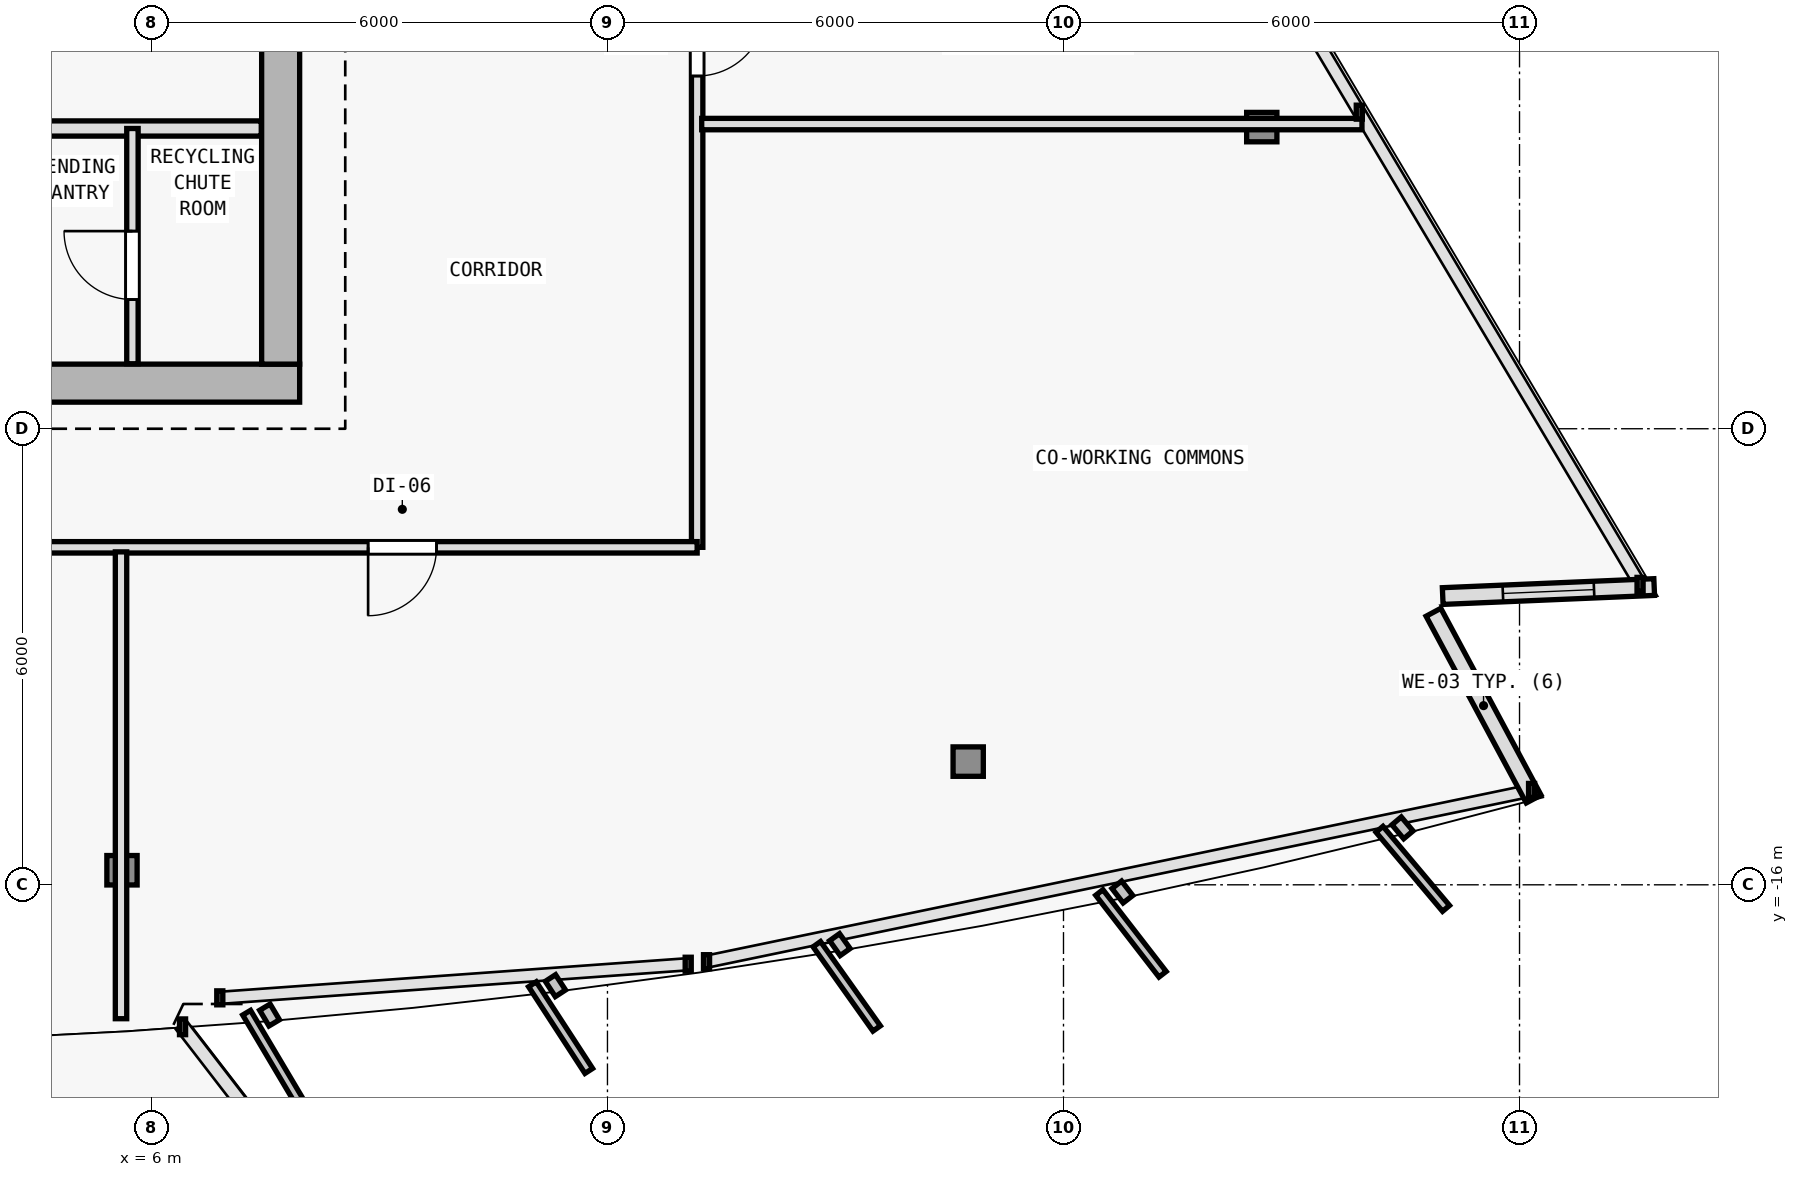
"""IFC4 building model, lengths in metres.
Left out: names, types, materials, properties, quantities, classifications, styles, units other than length and angle.
Written with IfcOpenShell. Run it as: python <this file> out.ifc"""

import sys

from ifc_helpers import new_model, si_unit, direction, frame, frame_2d, origin, origin_2d, place, context, subcontext, project, spatial, rectangle, i_section, extrude, element, fill, save


model = new_model("IFC4")
c1 = context("Model", 3, precision=1e-05, world=origin(), true_north=direction((0.0, 1.0)))
c2 = subcontext(c1, "Body", "Model", "MODEL_VIEW")
j1 = project(units=[si_unit("LENGTHUNIT", "METRE"), si_unit("PLANEANGLEUNIT", "RADIAN")], contexts=[c1])
p1 = place(None, origin())
s1 = spatial("IfcSite", under=j1, at=p1, CompositionType="ELEMENT")
p2 = place(p1, origin())
s2 = spatial("IfcBuilding", under=s1, at=p2, CompositionType="ELEMENT")
p3 = place(p2, frame((0.0, 0.0, 209.1)))
s3 = spatial("IfcBuildingStorey", under=s2, at=p3, CompositionType="ELEMENT", Elevation=209.1)
p4 = place(p3, frame((7.7, -9.4, 0.0), z_axis=(0.0, 0.0, 1.0), x_axis=(1.0, 0.0, 0.0)))
e1 = element("IfcColumn", 1, at=p4, inside=s3, PredefinedType="COLUMN", context=c2, shape_type="SweptSolid", body=[
    extrude(i_section(OverallWidth=0.398, OverallDepth=0.387, WebThickness=0.013, FlangeThickness=0.022, FilletRadius=0.015, at=origin_2d()), origin(), (0.0, 0.0, 1.0), 3.6),
])
p5 = place(p3, frame((5.613, -15.809, 0.005), z_axis=(-0.007137482158, 0.036299194974, 0.999315478111), x_axis=(-0.981211567536, -0.192934858785, 0.0)))
e2 = element("IfcColumn", 2, at=p5, inside=s3, PredefinedType="COLUMN", context=c2, shape_type="SweptSolid", body=[
    extrude(i_section(OverallWidth=0.398, OverallDepth=0.387, WebThickness=0.013, FlangeThickness=0.022, FilletRadius=0.015, at=origin_2d()), origin(), (0.0, 0.0, 1.0), 3.592),
])
p6 = place(p3, frame((16.746, -14.379, 0.005), z_axis=(-0.021205666627, 0.034459208269, 0.999181106041), x_axis=(-0.851658316705, -0.524097425664, 0.0)))
e3 = element("IfcColumn", 3, at=p6, inside=s3, PredefinedType="COLUMN", context=c2, shape_type="SweptSolid", body=[
    extrude(i_section(OverallWidth=0.398, OverallDepth=0.387, WebThickness=0.013, FlangeThickness=0.022, FilletRadius=0.015, at=origin_2d()), origin(), (0.0, 0.0, 1.0), 3.592),
])
p7 = place(p3, frame((20.609, -6.031, 0.005), z_axis=(-0.026852630098, 0.022161917499, 0.99939370904), x_axis=(-0.636528167794, -0.771253454842, 0.0)))
e4 = element("IfcColumn", 4, at=p7, inside=s3, PredefinedType="COLUMN", context=c2, shape_type="SweptSolid", body=[
    extrude(i_section(OverallWidth=0.398, OverallDepth=0.387, WebThickness=0.013, FlangeThickness=0.022, FilletRadius=0.015, at=origin_2d()), origin(), (0.0, 0.0, 1.0), 3.591),
])
p8 = place(p3, frame((22.868, -12.415, 0.0), z_axis=(0.0, 0.0, 1.0), x_axis=(0.472845900162, -0.881145138272, 0.0)))
e5 = element("IfcWall", 5, at=p8, inside=s3, PredefinedType="SOLIDWALL", context=c2, shape_type="SweptSolid", body=[
    extrude(rectangle(XDim=2.788, YDim=0.22, at=frame_2d((1.394, 0.0))), origin(), (0.0, 0.0, 1.0), 3.35),
])
p9 = place(p3, frame((25.772, -12.083, 0.0), z_axis=(0.0, 0.0, 1.0), x_axis=(-0.999095761456, -0.042516578425, 0.0)))
e6 = element("IfcWall", 6, at=p9, inside=s3, PredefinedType="SOLIDWALL", context=c2, shape_type="SweptSolid", body=[
    extrude(rectangle(XDim=2.785, YDim=0.22, at=frame_2d((1.393, 0.0))), origin(), (0.0, 0.0, 1.0), 3.35),
])
p10 = place(p9, frame((0.792, 0.0, 0.62)))
e7 = element("IfcOpeningElement", 7, at=p10, cuts=e6, PredefinedType="OPENING", context=c2, shape_type="SweptSolid", body=[
    extrude(rectangle(XDim=1.2, YDim=1.8, at=frame_2d((0.6, 0.9))), frame((0.0, 0.12, 0.0), z_axis=(0.0, -1.0, 0.0), x_axis=(1.0, 0.0, 0.0)), (0.0, 0.0, 1.0), 0.24),
])
p11 = place(p3, frame((-7.95, -9.4, 0.0), z_axis=(0.0, 0.0, 1.0), x_axis=(1.0, 0.0, 0.0)))
e8 = element("IfcWall", 8, at=p11, inside=s3, PredefinedType="SHEAR", context=c2, shape_type="SweptSolid", body=[
    extrude(rectangle(XDim=15.9, YDim=0.5, at=frame_2d((7.95, 0.0))), origin(), (0.0, 0.0, 1.0), 3.35),
])
p12 = place(p11, frame((9.6, 0.0, 0.0)))
e9 = element("IfcOpeningElement", 9, at=p12, cuts=e8, PredefinedType="OPENING", context=c2, shape_type="SweptSolid", body=[
    extrude(rectangle(XDim=1.5, YDim=2.2, at=frame_2d((0.75, 1.1))), frame((0.0, 0.26, 0.0), z_axis=(0.0, -1.0, 0.0), x_axis=(1.0, 0.0, 0.0)), (0.0, 0.0, 1.0), 0.52),
])
p13 = place(p3, frame((7.7, 9.95, 0.0), z_axis=(0.0, 0.0, 1.0), x_axis=(0.0, -1.0, 0.0)))
e10 = element("IfcWall", 10, at=p13, inside=s3, PredefinedType="SHEAR", context=c2, shape_type="SweptSolid", body=[
    extrude(rectangle(XDim=19.1, YDim=0.5, at=frame_2d((9.55, 0.0))), origin(), (0.0, 0.0, 1.0), 3.35),
])
p14 = place(p3, frame((4.15, -6.05, 0.0), z_axis=(0.0, 0.0, 1.0), x_axis=(1.0, 0.0, 0.0)))
e11 = element("IfcWall", 11, at=p14, inside=s3, PredefinedType="SOLIDWALL", context=c2, shape_type="SweptSolid", body=[
    extrude(rectangle(XDim=3.295, YDim=0.2, at=frame_2d((1.647, 0.0))), origin(), (0.0, 0.0, 1.0), 3.35),
])
p15 = place(p3, frame((5.75, -9.145, 0.0), z_axis=(0.0, 0.0, 1.0), x_axis=(0.0, 1.0, 0.0)))
e12 = element("IfcWall", 12, at=p15, inside=s3, PredefinedType="PARTITIONING", context=c2, shape_type="SweptSolid", body=[
    extrude(rectangle(XDim=3.095, YDim=0.15, at=frame_2d((1.547, 0.0))), origin(), (0.0, 0.0, 1.0), 3.35),
])
p16 = place(p15, frame((0.845, 0.0, 0.0)))
e13 = element("IfcOpeningElement", 13, at=p16, cuts=e12, PredefinedType="OPENING", context=c2, shape_type="SweptSolid", body=[
    extrude(rectangle(XDim=0.9, YDim=2.1, at=frame_2d((0.45, 1.05))), frame((0.0, 0.085, 0.0), z_axis=(0.0, -1.0, 0.0), x_axis=(1.0, 0.0, 0.0)), (0.0, 0.0, 1.0), 0.17),
])
p17 = place(p3, frame((13.18, 8.444, 0.0), z_axis=(0.0, 0.0, 1.0), x_axis=(0.0, -1.0, 0.0)))
e14 = element("IfcWall", 14, at=p17, inside=s3, PredefinedType="PARTITIONING", context=c2, shape_type="SweptSolid", body=[
    extrude(rectangle(XDim=20.004, YDim=0.15, at=frame_2d((10.002, 0.0))), origin(), (0.0, 0.0, 1.0), 2.825),
])
p18 = place(p17, frame((12.904, 0.0, 0.0)))
e15 = element("IfcOpeningElement", 15, at=p18, cuts=e14, PredefinedType="OPENING", context=c2, shape_type="SweptSolid", body=[
    extrude(rectangle(XDim=0.9, YDim=2.1, at=frame_2d((0.45, 1.05))), frame((0.0, 0.085, 0.0), z_axis=(0.0, -1.0, 0.0), x_axis=(1.0, 0.0, 0.0)), (0.0, 0.0, 1.0), 0.17),
])
p19 = place(p17, frame((10.386, 0.0, 0.0)))
e16 = element("IfcOpeningElement", 16, at=p19, cuts=e14, PredefinedType="OPENING", context=c2, shape_type="SweptSolid", body=[
    extrude(rectangle(XDim=0.9, YDim=2.1, at=frame_2d((0.45, 1.05))), frame((0.0, 0.085, 0.0), z_axis=(0.0, -1.0, 0.0), x_axis=(1.0, 0.0, 0.0)), (0.0, 0.0, 1.0), 0.17),
])
p20 = place(p17, frame((7.692, 0.0, 0.0)))
e17 = element("IfcOpeningElement", 17, at=p20, cuts=e14, PredefinedType="OPENING", context=c2, shape_type="SweptSolid", body=[
    extrude(rectangle(XDim=0.9, YDim=2.1, at=frame_2d((0.45, 1.05))), frame((0.0, 0.085, 0.0), z_axis=(0.0, -1.0, 0.0), x_axis=(1.0, 0.0, 0.0)), (0.0, 0.0, 1.0), 0.17),
])
p21 = place(p17, frame((5.262, 0.0, 0.0)))
e18 = element("IfcOpeningElement", 18, at=p21, cuts=e14, PredefinedType="OPENING", context=c2, shape_type="SweptSolid", body=[
    extrude(rectangle(XDim=0.9, YDim=2.1, at=frame_2d((0.45, 1.05))), frame((0.0, 0.085, 0.0), z_axis=(0.0, -1.0, 0.0), x_axis=(1.0, 0.0, 0.0)), (0.0, 0.0, 1.0), 0.17),
])
p22 = place(p3, frame((13.18, -11.56, 0.0), z_axis=(0.0, 0.0, 1.0), x_axis=(-1.0, 0.0, 0.0)))
e19 = element("IfcWall", 19, at=p22, inside=s3, PredefinedType="PARTITIONING", context=c2, shape_type="SweptSolid", body=[
    extrude(rectangle(XDim=23.04, YDim=0.15, at=frame_2d((11.52, 0.0))), origin(), (0.0, 0.0, 1.0), 2.825),
])
p23 = place(p22, frame((20.371, 0.0, 0.0)))
e20 = element("IfcOpeningElement", 20, at=p23, cuts=e19, PredefinedType="OPENING", context=c2, shape_type="SweptSolid", body=[
    extrude(rectangle(XDim=0.9, YDim=2.1, at=frame_2d((0.45, 1.05))), frame((0.0, 0.085, 0.0), z_axis=(0.0, -1.0, 0.0), x_axis=(1.0, 0.0, 0.0)), (0.0, 0.0, 1.0), 0.17),
])
p24 = place(p22, frame((12.73, 0.0, 0.0)))
e21 = element("IfcOpeningElement", 21, at=p24, cuts=e19, PredefinedType="OPENING", context=c2, shape_type="SweptSolid", body=[
    extrude(rectangle(XDim=0.9, YDim=2.1, at=frame_2d((0.45, 1.05))), frame((0.0, 0.085, 0.0), z_axis=(0.0, -1.0, 0.0), x_axis=(1.0, 0.0, 0.0)), (0.0, 0.0, 1.0), 0.17),
])
p25 = place(p22, frame((3.429, 0.0, 0.0)))
e22 = element("IfcOpeningElement", 22, at=p25, cuts=e19, PredefinedType="OPENING", context=c2, shape_type="SweptSolid", body=[
    extrude(rectangle(XDim=0.9, YDim=2.1, at=frame_2d((0.45, 1.05))), frame((0.0, 0.085, 0.0), z_axis=(0.0, -1.0, 0.0), x_axis=(1.0, 0.0, 0.0)), (0.0, 0.0, 1.0), 0.17),
])
p26 = place(p3, frame((5.6, -11.62, 0.0), z_axis=(0.0, 0.0, 1.0), x_axis=(0.0, -1.0, 0.0)))
e23 = element("IfcWall", 23, at=p26, inside=s3, PredefinedType="PARTITIONING", context=c2, shape_type="SweptSolid", body=[
    extrude(rectangle(XDim=6.142, YDim=0.15, at=frame_2d((3.071, 0.0))), origin(), (0.0, 0.0, 1.0), 2.965),
])
p27 = place(p3, frame((13.24, -5.992, 0.0), z_axis=(0.0, 0.0, 1.0), x_axis=(1.0, 0.0, 0.0)))
e24 = element("IfcWall", 24, at=p27, inside=s3, PredefinedType="PARTITIONING", context=c2, shape_type="SweptSolid", body=[
    extrude(rectangle(XDim=8.687, YDim=0.15, at=frame_2d((4.344, 0.0))), origin(), (0.0, 0.0, 1.0), 2.825),
])
p28 = place(p10, origin())
e25 = element("IfcWindow", 25, at=p28, inside=s3, PartitioningType="SINGLE_PANEL", PredefinedType="WINDOW", context=c2, shape_type="SweptSolid", body=[
    extrude(rectangle(XDim=1.2, YDim=1.8, at=frame_2d((0.6, 0.9))), frame((0.0, 0.03, 0.0), z_axis=(0.0, -1.0, 0.0), x_axis=(1.0, 0.0, 0.0)), (0.0, 0.0, 1.0), 0.06),
])
fill(e7, e25)
p29 = place(p16, origin())
e26 = element("IfcDoor", 26, at=p29, inside=s3, OperationType="SINGLE_SWING_RIGHT", PredefinedType="DOOR", context=c2, shape_type="SweptSolid", body=[
    extrude(rectangle(XDim=0.9, YDim=2.1, at=frame_2d((0.45, 1.05))), frame((0.0, 0.025, 0.0), z_axis=(0.0, -1.0, 0.0), x_axis=(1.0, 0.0, 0.0)), (0.0, 0.0, 1.0), 0.05),
])
fill(e13, e26)
p30 = place(p25, origin())
e27 = element("IfcDoor", 27, at=p30, inside=s3, OperationType="SINGLE_SWING_RIGHT", PredefinedType="DOOR", context=c2, shape_type="SweptSolid", body=[
    extrude(rectangle(XDim=0.9, YDim=2.1, at=frame_2d((0.45, 1.05))), frame((0.0, 0.025, 0.0), z_axis=(0.0, -1.0, 0.0), x_axis=(1.0, 0.0, 0.0)), (0.0, 0.0, 1.0), 0.05),
])
fill(e22, e27)
p31 = place(p18, origin())
e28 = element("IfcDoor", 28, at=p31, inside=s3, OperationType="SINGLE_SWING_LEFT", PredefinedType="DOOR", context=c2, shape_type="SweptSolid", body=[
    extrude(rectangle(XDim=0.9, YDim=2.1, at=frame_2d((0.45, 1.05))), frame((0.0, 0.025, 0.0), z_axis=(0.0, -1.0, 0.0), x_axis=(1.0, 0.0, 0.0)), (0.0, 0.0, 1.0), 0.05),
])
fill(e15, e28)
save(model, sys.argv[1])
